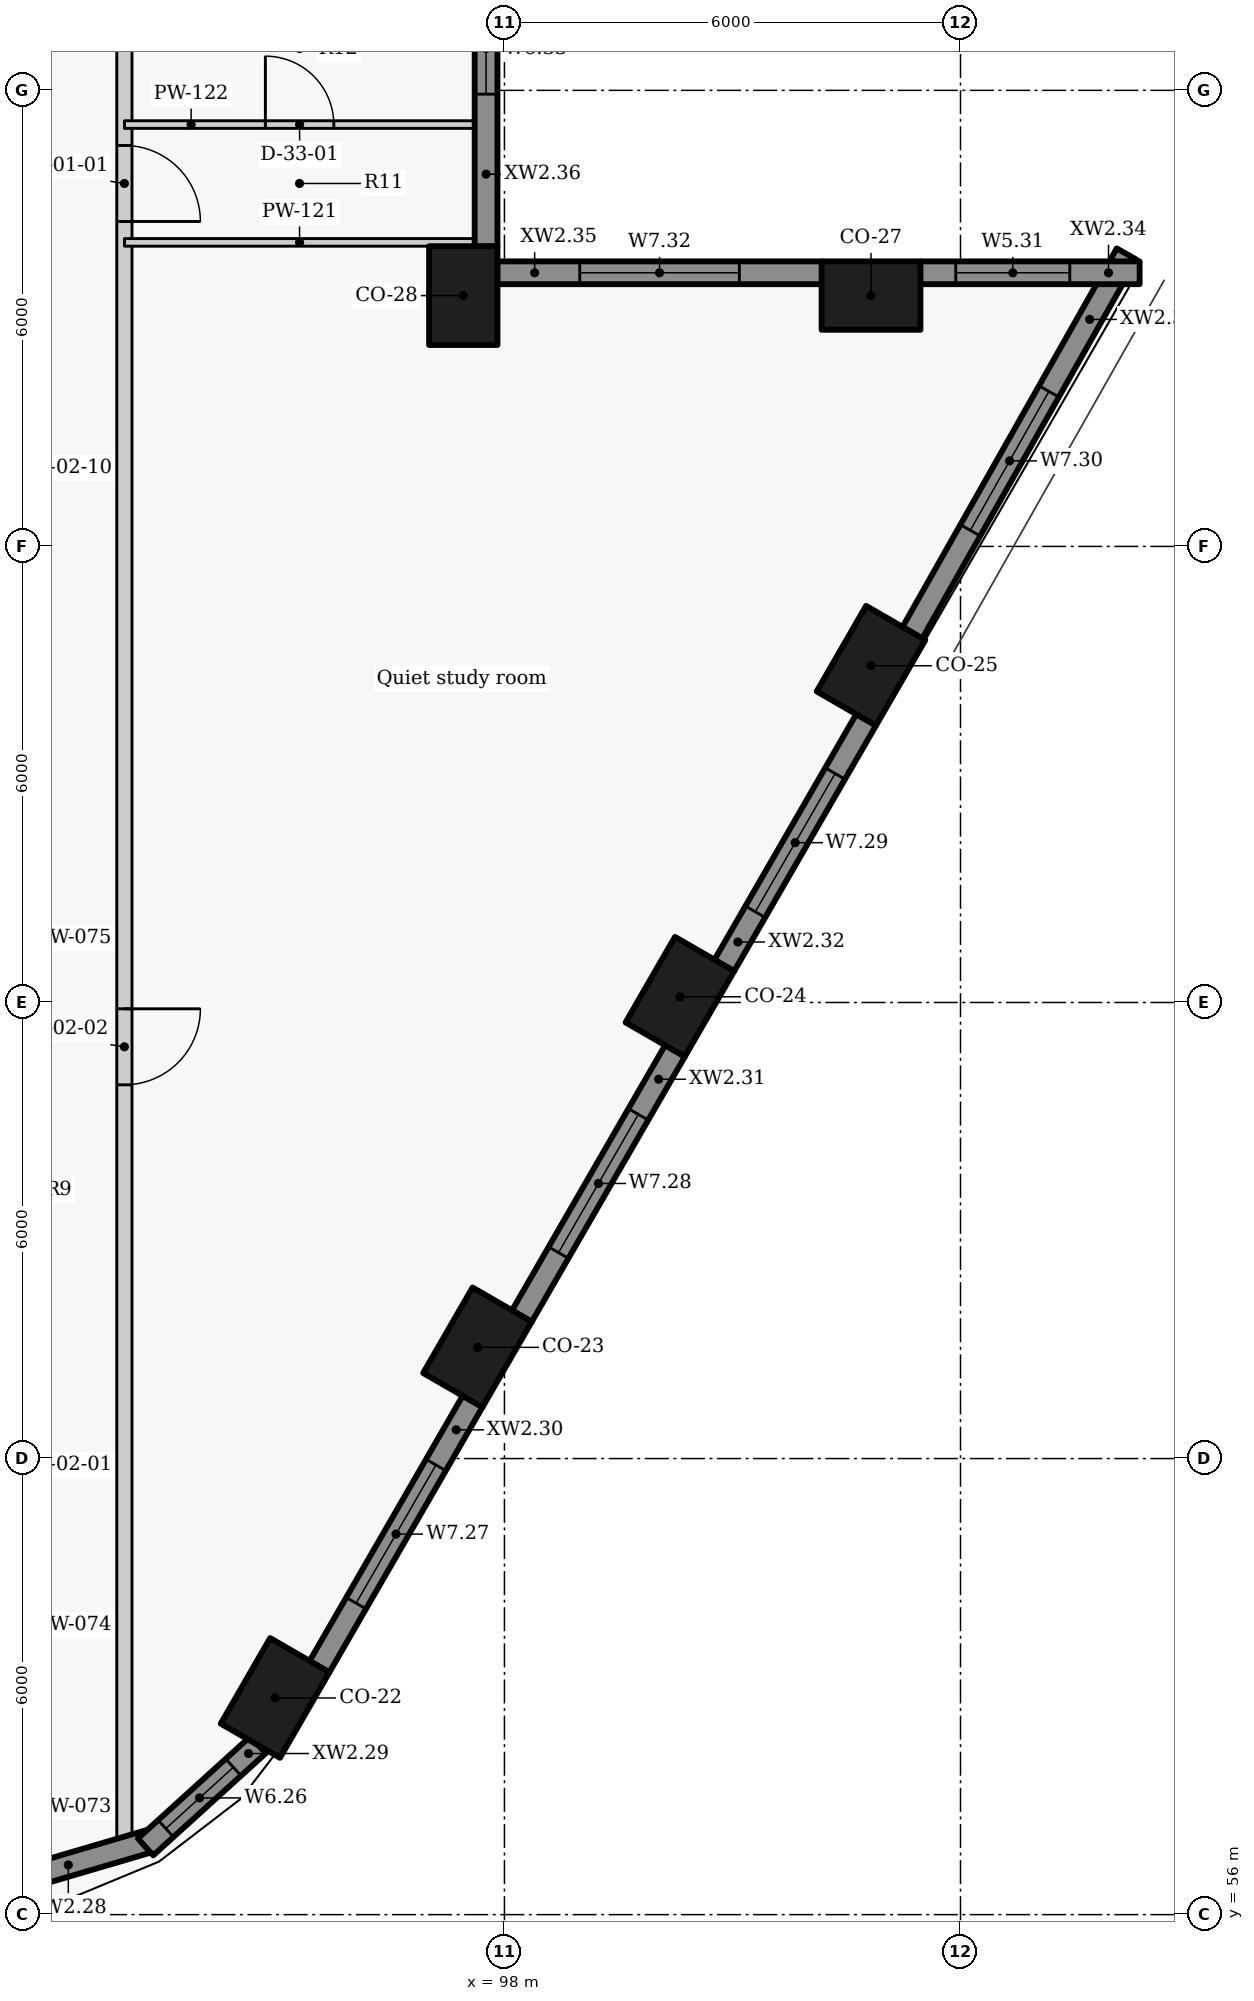
"""IFC4 building model, lengths in metres.
Left out: names, types, materials, properties, quantities, classifications, styles, units other than length and angle.
Written with IfcOpenShell. Run it as: python <this file> out.ifc"""

import sys

from ifc_helpers import new_model, si_unit, direction, frame, frame_2d, origin, origin_2d, place, context, subcontext, project, spatial, rectangle, extrude, element, fill, save


model = new_model("IFC4")
c1 = context("Model", 3, precision=1e-05, world=origin(), true_north=direction((0.0, 1.0)))
c2 = subcontext(c1, "Body", "Model", "MODEL_VIEW")
j1 = project(units=[si_unit("LENGTHUNIT", "METRE"), si_unit("PLANEANGLEUNIT", "RADIAN")], contexts=[c1])
p1 = place(None, origin())
s1 = spatial("IfcSite", under=j1, at=p1, CompositionType="ELEMENT")
p2 = place(p1, origin())
s2 = spatial("IfcBuilding", under=s1, at=p2, CompositionType="ELEMENT")
p3 = place(p2, frame((0.0, 0.0, 127.2)))
s3 = spatial("IfcBuildingStorey", under=s2, at=p3, CompositionType="ELEMENT", Elevation=127.2)
for number, where, z_axis, x_axis in (
    (1, (94.982, 58.851, 0.0), (0.0, 0.0, 1.0), (0.5, 0.866, 0.0)),
    (2, (97.646, 63.463, 0.0), (0.0, 0.0, 1.0), (0.5, 0.866, 0.0)),
    (3, (100.308, 68.075, 0.0), (0.0, 0.0, 1.0), (0.5, 0.866, 0.0)),
    (4, (102.823, 72.43, 0.0), (0.0, 0.0, 1.0), (0.5, 0.866, 0.0)),
    (5, (102.823, 77.3, 0.0), (0.0, 0.0, 1.0), (-1.0, 0.0, 0.0)),
    (6, (97.458, 77.3, 0.0), (0.0, 0.0, 1.0), (0.0, 1.0, 0.0)),
):
    element("IfcColumn", number, at=place(p3, frame(where, z_axis=z_axis, x_axis=x_axis)), inside=s3, PredefinedType="COLUMN", context=c2, shape_type="SweptSolid", body=[
        extrude(rectangle(XDim=1.3, YDim=0.9, at=origin_2d()), origin(), (0.0, 0.0, 1.0), 3.3),
    ])
p4 = place(p3, frame((91.153, 56.328, 0.0), z_axis=(0.0, 0.0, 1.0), x_axis=(0.959473072336, 0.281800325517, 0.0)))
e7 = element("IfcWall", 7, at=p4, inside=s3, PredefinedType="SOLIDWALL", context=c2, shape_type="SweptSolid", body=[
    extrude(rectangle(XDim=2.312, YDim=0.3, at=frame_2d((1.156, 0.0))), origin(), (0.0, 0.0, 1.0), 2.425),
])
p5 = place(p3, frame((93.278, 56.89, 0.0), z_axis=(0.0, 0.0, 1.0), x_axis=(0.740652597499, 0.671888182526, 0.0)))
e8 = element("IfcWall", 8, at=p5, inside=s3, PredefinedType="SOLIDWALL", context=c2, shape_type="SweptSolid", body=[
    extrude(rectangle(XDim=1.999, YDim=0.3, at=frame_2d((1.0, 0.0))), origin(), (0.0, 0.0, 1.0), 2.425),
])
p6 = place(p5, frame((0.36, 0.0, 0.9)))
e9 = element("IfcOpeningElement", 9, at=p6, cuts=e8, PredefinedType="OPENING", context=c2, shape_type="SweptSolid", body=[
    extrude(rectangle(XDim=1.2, YDim=1.1, at=frame_2d((0.6, 0.55))), frame((0.0, 0.16, 0.0), z_axis=(0.0, -1.0, 0.0), x_axis=(1.0, 0.0, 0.0)), (0.0, 0.0, 1.0), 0.32),
])
p7 = place(p3, frame((95.565, 59.26, 0.0), z_axis=(0.0, 0.0, 1.0), x_axis=(0.500031546601, 0.86600718958, 0.0)))
e10 = element("IfcWall", 10, at=p7, inside=s3, PredefinedType="SOLIDWALL", context=c2, shape_type="SweptSolid", body=[
    extrude(rectangle(XDim=4.034, YDim=0.3, at=frame_2d((2.017, 0.0))), origin(), (0.0, 0.0, 1.0), 2.425),
])
p8 = place(p7, frame((0.967, 0.0, 0.9)))
e11 = element("IfcOpeningElement", 11, at=p8, cuts=e10, PredefinedType="OPENING", context=c2, shape_type="SweptSolid", body=[
    extrude(rectangle(XDim=2.1, YDim=1.1, at=frame_2d((1.05, 0.55))), frame((0.0, 0.16, 0.0), z_axis=(0.0, -1.0, 0.0), x_axis=(1.0, 0.0, 0.0)), (0.0, 0.0, 1.0), 0.32),
])
p9 = place(p3, frame((98.228, 63.872, 0.0), z_axis=(0.0, 0.0, 1.0), x_axis=(0.500031546601, 0.86600718958, 0.0)))
e12 = element("IfcWall", 12, at=p9, inside=s3, PredefinedType="SOLIDWALL", context=c2, shape_type="SweptSolid", body=[
    extrude(rectangle(XDim=4.034, YDim=0.3, at=frame_2d((2.017, 0.0))), origin(), (0.0, 0.0, 1.0), 2.425),
])
p10 = place(p9, frame((0.967, 0.0, 0.9)))
e13 = element("IfcOpeningElement", 13, at=p10, cuts=e12, PredefinedType="OPENING", context=c2, shape_type="SweptSolid", body=[
    extrude(rectangle(XDim=2.1, YDim=1.1, at=frame_2d((1.05, 0.55))), frame((0.0, 0.16, 0.0), z_axis=(0.0, -1.0, 0.0), x_axis=(1.0, 0.0, 0.0)), (0.0, 0.0, 1.0), 0.32),
])
p11 = place(p3, frame((100.891, 68.485, 0.0), z_axis=(0.0, 0.0, 1.0), x_axis=(0.499933594891, 0.866063739398, 0.0)))
e14 = element("IfcWall", 14, at=p11, inside=s3, PredefinedType="SOLIDWALL", context=c2, shape_type="SweptSolid", body=[
    extrude(rectangle(XDim=3.737, YDim=0.3, at=frame_2d((1.868, 0.0))), origin(), (0.0, 0.0, 1.0), 2.425),
])
p12 = place(p11, frame((0.818, 0.0, 0.9)))
e15 = element("IfcOpeningElement", 15, at=p12, cuts=e14, PredefinedType="OPENING", context=c2, shape_type="SweptSolid", body=[
    extrude(rectangle(XDim=2.1, YDim=1.1, at=frame_2d((1.05, 0.55))), frame((0.0, 0.16, 0.0), z_axis=(0.0, -1.0, 0.0), x_axis=(1.0, 0.0, 0.0)), (0.0, 0.0, 1.0), 0.32),
])
p13 = place(p3, frame((103.366, 72.863, 0.0), z_axis=(0.0, 0.0, 1.0), x_axis=(0.492498306264, 0.87031340236, 0.0)))
e16 = element("IfcWall", 16, at=p13, inside=s3, PredefinedType="SOLIDWALL", context=c2, shape_type="SweptSolid", body=[
    extrude(rectangle(XDim=5.727, YDim=0.3, at=frame_2d((2.863, 0.0))), origin(), (0.0, 0.0, 1.0), 2.425),
])
p14 = place(p13, frame((1.55, 0.0, 0.9)))
e17 = element("IfcOpeningElement", 17, at=p14, cuts=e16, PredefinedType="OPENING", context=c2, shape_type="SweptSolid", body=[
    extrude(rectangle(XDim=2.1, YDim=1.1, at=frame_2d((1.05, 0.55))), frame((0.0, 0.16, 0.0), z_axis=(0.0, -1.0, 0.0), x_axis=(1.0, 0.0, 0.0)), (0.0, 0.0, 1.0), 0.32),
])
p15 = place(p3, frame((106.357, 77.6, 0.0), z_axis=(0.0, 0.0, 1.0), x_axis=(-1.0, 0.0, 0.0)))
e18 = element("IfcWall", 18, at=p15, inside=s3, PredefinedType="SOLIDWALL", context=c2, shape_type="SweptSolid", body=[
    extrude(rectangle(XDim=2.888, YDim=0.3, at=frame_2d((1.444, 0.0))), origin(), (0.0, 0.0, 1.0), 2.425),
])
p16 = place(p15, frame((0.919, 0.0, 0.9)))
e19 = element("IfcOpeningElement", 19, at=p16, cuts=e18, PredefinedType="OPENING", context=c2, shape_type="SweptSolid", body=[
    extrude(rectangle(XDim=1.5, YDim=1.1, at=frame_2d((0.75, 0.55))), frame((0.0, 0.16, 0.0), z_axis=(0.0, -1.0, 0.0), x_axis=(1.0, 0.0, 0.0)), (0.0, 0.0, 1.0), 0.32),
])
p17 = place(p3, frame((102.177, 77.6, 0.0), z_axis=(0.0, 0.0, 1.0), x_axis=(-1.0, 0.0, 0.0)))
e20 = element("IfcWall", 20, at=p17, inside=s3, PredefinedType="SOLIDWALL", context=c2, shape_type="SweptSolid", body=[
    extrude(rectangle(XDim=4.273, YDim=0.3, at=frame_2d((2.136, 0.0))), origin(), (0.0, 0.0, 1.0), 2.425),
])
p18 = place(p17, frame((1.086, 0.0, 0.9)))
e21 = element("IfcOpeningElement", 21, at=p18, cuts=e20, PredefinedType="OPENING", context=c2, shape_type="SweptSolid", body=[
    extrude(rectangle(XDim=2.1, YDim=1.1, at=frame_2d((1.05, 0.55))), frame((0.0, 0.16, 0.0), z_axis=(0.0, -1.0, 0.0), x_axis=(1.0, 0.0, 0.0)), (0.0, 0.0, 1.0), 0.32),
])
p19 = place(p3, frame((97.758, 77.946, 0.0), z_axis=(0.0, 0.0, 1.0), x_axis=(0.0, 1.0, 0.0)))
e22 = element("IfcWall", 22, at=p19, inside=s3, PredefinedType="SOLIDWALL", context=c2, shape_type="SweptSolid", body=[
    extrude(rectangle(XDim=4.308, YDim=0.3, at=frame_2d((2.154, 0.0))), origin(), (0.0, 0.0, 1.0), 2.425),
])
p20 = place(p19, frame((2.004, 0.0, 0.9)))
e23 = element("IfcOpeningElement", 23, at=p20, cuts=e22, PredefinedType="OPENING", context=c2, shape_type="SweptSolid", body=[
    extrude(rectangle(XDim=1.2, YDim=1.1, at=frame_2d((0.6, 0.55))), frame((0.0, 0.16, 0.0), z_axis=(0.0, -1.0, 0.0), x_axis=(1.0, 0.0, 0.0)), (0.0, 0.0, 1.0), 0.32),
])
p21 = place(p3, frame((93.0, 102.498, 0.0), z_axis=(0.0, 0.0, 1.0), x_axis=(0.0, -1.0, 0.0)))
e24 = element("IfcWall", 24, at=p21, inside=s3, PredefinedType="PARTITIONING", context=c2, shape_type="SweptSolid", body=[
    extrude(rectangle(XDim=45.665, YDim=0.2, at=frame_2d((22.833, 0.0))), origin(), (0.0, 0.0, 1.0), 2.405),
])
p22 = place(p21, frame((34.581, 0.0, 0.0)))
e25 = element("IfcOpeningElement", 25, at=p22, cuts=e24, PredefinedType="OPENING", context=c2, shape_type="SweptSolid", body=[
    extrude(rectangle(XDim=1.0, YDim=2.1, at=frame_2d((0.5, 1.05))), frame((0.0, 0.11, 0.0), z_axis=(0.0, -1.0, 0.0), x_axis=(1.0, 0.0, 0.0)), (0.0, 0.0, 1.0), 0.22),
])
p23 = place(p21, frame((23.223, 0.0, 0.0)))
e26 = element("IfcOpeningElement", 26, at=p23, cuts=e24, PredefinedType="OPENING", context=c2, shape_type="SweptSolid", body=[
    extrude(rectangle(XDim=1.0, YDim=2.1, at=frame_2d((0.5, 1.05))), frame((0.0, 0.11, 0.0), z_axis=(0.0, -1.0, 0.0), x_axis=(1.0, 0.0, 0.0)), (0.0, 0.0, 1.0), 0.22),
])
p24 = place(p21, frame((7.715, 0.0, 0.0)))
e27 = element("IfcOpeningElement", 27, at=p24, cuts=e24, PredefinedType="OPENING", context=c2, shape_type="SweptSolid", body=[
    extrude(rectangle(XDim=1.0, YDim=2.1, at=frame_2d((0.5, 1.05))), frame((0.0, 0.11, 0.0), z_axis=(0.0, -1.0, 0.0), x_axis=(1.0, 0.0, 0.0)), (0.0, 0.0, 1.0), 0.22),
])
p25 = place(p21, frame((3.21, 0.0, 0.0)))
e28 = element("IfcOpeningElement", 28, at=p25, cuts=e24, PredefinedType="OPENING", context=c2, shape_type="SweptSolid", body=[
    extrude(rectangle(XDim=1.0, YDim=2.1, at=frame_2d((0.5, 1.05))), frame((0.0, 0.11, 0.0), z_axis=(0.0, -1.0, 0.0), x_axis=(1.0, 0.0, 0.0)), (0.0, 0.0, 1.0), 0.22),
])
p26 = place(p3, frame((93.001, 78.0, 0.0), z_axis=(0.0, 0.0, 1.0), x_axis=(1.0, 0.0, 0.0)))
e29 = element("IfcWall", 29, at=p26, inside=s3, PredefinedType="PARTITIONING", context=c2, shape_type="SweptSolid", body=[
    extrude(rectangle(XDim=4.607, YDim=0.1, at=frame_2d((2.304, 0.0))), origin(), (0.0, 0.0, 1.0), 2.405),
])
p27 = place(p3, frame((93.001, 79.55, 0.0), z_axis=(0.0, 0.0, 1.0), x_axis=(1.0, 0.0, 0.0)))
e30 = element("IfcWall", 30, at=p27, inside=s3, PredefinedType="PARTITIONING", context=c2, shape_type="SweptSolid", body=[
    extrude(rectangle(XDim=4.607, YDim=0.1, at=frame_2d((2.304, 0.0))), origin(), (0.0, 0.0, 1.0), 2.405),
])
p28 = place(p27, frame((1.854, 0.0, 0.0)))
e31 = element("IfcOpeningElement", 31, at=p28, cuts=e30, PredefinedType="OPENING", context=c2, shape_type="SweptSolid", body=[
    extrude(rectangle(XDim=0.9, YDim=2.1, at=frame_2d((0.45, 1.05))), frame((0.0, 0.06, 0.0), z_axis=(0.0, -1.0, 0.0), x_axis=(1.0, 0.0, 0.0)), (0.0, 0.0, 1.0), 0.12),
])
p29 = place(p6, origin())
e32 = element("IfcWindow", 32, at=p29, inside=s3, PartitioningType="SINGLE_PANEL", PredefinedType="WINDOW", context=c2, shape_type="SweptSolid", body=[
    extrude(rectangle(XDim=1.2, YDim=1.1, at=frame_2d((0.6, 0.55))), frame((0.0, 0.03, 0.0), z_axis=(0.0, -1.0, 0.0), x_axis=(1.0, 0.0, 0.0)), (0.0, 0.0, 1.0), 0.06),
])
fill(e9, e32)
p30 = place(p8, origin())
e33 = element("IfcWindow", 33, at=p30, inside=s3, PartitioningType="SINGLE_PANEL", PredefinedType="WINDOW", context=c2, shape_type="SweptSolid", body=[
    extrude(rectangle(XDim=2.1, YDim=1.1, at=frame_2d((1.05, 0.55))), frame((0.0, 0.03, 0.0), z_axis=(0.0, -1.0, 0.0), x_axis=(1.0, 0.0, 0.0)), (0.0, 0.0, 1.0), 0.06),
])
fill(e11, e33)
p31 = place(p10, origin())
e34 = element("IfcWindow", 34, at=p31, inside=s3, PartitioningType="SINGLE_PANEL", PredefinedType="WINDOW", context=c2, shape_type="SweptSolid", body=[
    extrude(rectangle(XDim=2.1, YDim=1.1, at=frame_2d((1.05, 0.55))), frame((0.0, 0.03, 0.0), z_axis=(0.0, -1.0, 0.0), x_axis=(1.0, 0.0, 0.0)), (0.0, 0.0, 1.0), 0.06),
])
fill(e13, e34)
p32 = place(p12, origin())
e35 = element("IfcWindow", 35, at=p32, inside=s3, PartitioningType="SINGLE_PANEL", PredefinedType="WINDOW", context=c2, shape_type="SweptSolid", body=[
    extrude(rectangle(XDim=2.1, YDim=1.1, at=frame_2d((1.05, 0.55))), frame((0.0, 0.03, 0.0), z_axis=(0.0, -1.0, 0.0), x_axis=(1.0, 0.0, 0.0)), (0.0, 0.0, 1.0), 0.06),
])
fill(e15, e35)
p33 = place(p14, origin())
e36 = element("IfcWindow", 36, at=p33, inside=s3, PartitioningType="SINGLE_PANEL", PredefinedType="WINDOW", context=c2, shape_type="SweptSolid", body=[
    extrude(rectangle(XDim=2.1, YDim=1.1, at=frame_2d((1.05, 0.55))), frame((0.0, 0.03, 0.0), z_axis=(0.0, -1.0, 0.0), x_axis=(1.0, 0.0, 0.0)), (0.0, 0.0, 1.0), 0.06),
])
fill(e17, e36)
p34 = place(p16, origin())
e37 = element("IfcWindow", 37, at=p34, inside=s3, PartitioningType="SINGLE_PANEL", PredefinedType="WINDOW", context=c2, shape_type="SweptSolid", body=[
    extrude(rectangle(XDim=1.5, YDim=1.1, at=frame_2d((0.75, 0.55))), frame((0.0, 0.03, 0.0), z_axis=(0.0, -1.0, 0.0), x_axis=(1.0, 0.0, 0.0)), (0.0, 0.0, 1.0), 0.06),
])
fill(e19, e37)
p35 = place(p18, origin())
e38 = element("IfcWindow", 38, at=p35, inside=s3, PartitioningType="SINGLE_PANEL", PredefinedType="WINDOW", context=c2, shape_type="SweptSolid", body=[
    extrude(rectangle(XDim=2.1, YDim=1.1, at=frame_2d((1.05, 0.55))), frame((0.0, 0.03, 0.0), z_axis=(0.0, -1.0, 0.0), x_axis=(1.0, 0.0, 0.0)), (0.0, 0.0, 1.0), 0.06),
])
fill(e21, e38)
p36 = place(p20, origin())
e39 = element("IfcWindow", 39, at=p36, inside=s3, PartitioningType="SINGLE_PANEL", PredefinedType="WINDOW", context=c2, shape_type="SweptSolid", body=[
    extrude(rectangle(XDim=1.2, YDim=1.1, at=frame_2d((0.6, 0.55))), frame((0.0, 0.03, 0.0), z_axis=(0.0, -1.0, 0.0), x_axis=(1.0, 0.0, 0.0)), (0.0, 0.0, 1.0), 0.06),
])
fill(e23, e39)
p37 = place(p22, origin())
e40 = element("IfcDoor", 40, at=p37, inside=s3, OperationType="SINGLE_SWING_LEFT", PredefinedType="DOOR", context=c2, shape_type="SweptSolid", body=[
    extrude(rectangle(XDim=1.0, YDim=2.1, at=frame_2d((0.5, 1.05))), frame((0.0, 0.025, 0.0), z_axis=(0.0, -1.0, 0.0), x_axis=(1.0, 0.0, 0.0)), (0.0, 0.0, 1.0), 0.05),
])
fill(e25, e40)
p38 = place(p23, origin())
e41 = element("IfcDoor", 41, at=p38, inside=s3, OperationType="SINGLE_SWING_RIGHT", PredefinedType="DOOR", context=c2, shape_type="SweptSolid", body=[
    extrude(rectangle(XDim=1.0, YDim=2.1, at=frame_2d((0.5, 1.05))), frame((0.0, 0.025, 0.0), z_axis=(0.0, -1.0, 0.0), x_axis=(1.0, 0.0, 0.0)), (0.0, 0.0, 1.0), 0.05),
])
fill(e26, e41)
p39 = place(p28, origin())
e42 = element("IfcDoor", 42, at=p39, inside=s3, OperationType="SINGLE_SWING_LEFT", PredefinedType="DOOR", context=c2, shape_type="SweptSolid", body=[
    extrude(rectangle(XDim=0.9, YDim=2.1, at=frame_2d((0.45, 1.05))), frame((0.0, 0.025, 0.0), z_axis=(0.0, -1.0, 0.0), x_axis=(1.0, 0.0, 0.0)), (0.0, 0.0, 1.0), 0.05),
])
fill(e31, e42)
save(model, sys.argv[1])
